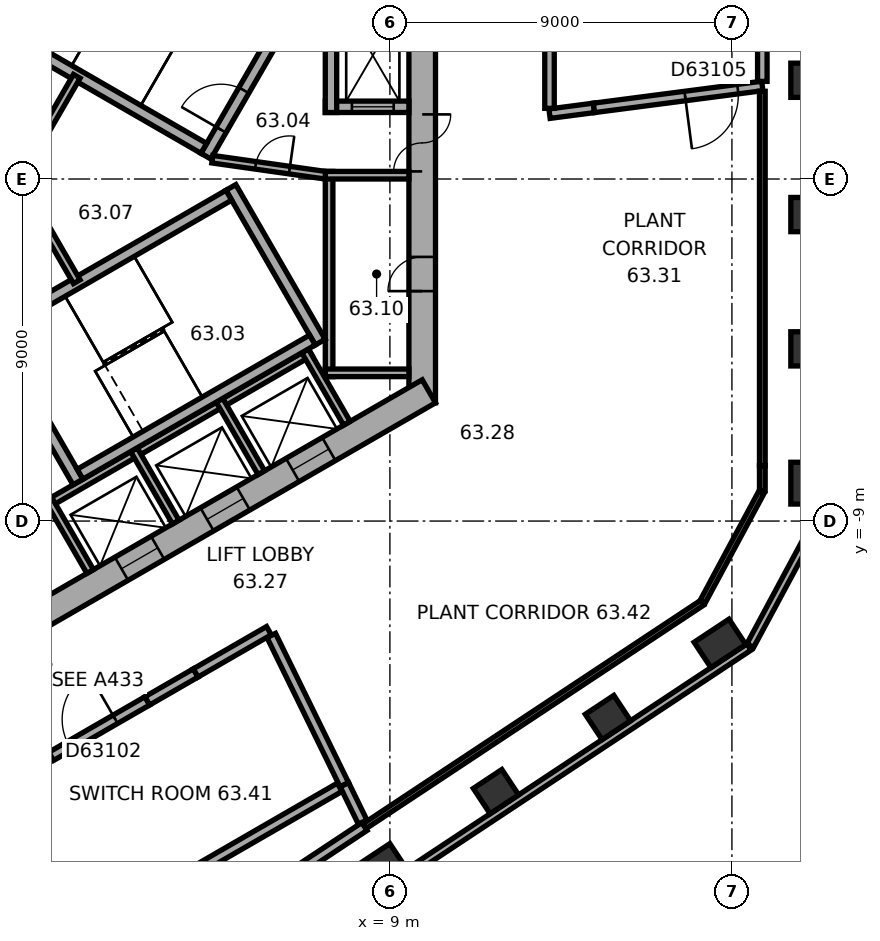
"""IFC4 building model, lengths in metres.
Left out: names, types, materials, properties, quantities, classifications, styles, units other than length and angle.
Written with IfcOpenShell. Run it as: python <this file> out.ifc"""

import sys

from ifc_helpers import new_model, si_unit, direction, frame, frame_2d, origin, origin_2d, place, context, subcontext, project, spatial, rectangle, extrude, element, fill, save


model = new_model("IFC4")
c1 = context("Model", 3, precision=1e-05, world=origin(), true_north=direction((0.0, 1.0)))
c2 = subcontext(c1, "Body", "Model", "MODEL_VIEW")
j1 = project(units=[si_unit("LENGTHUNIT", "METRE"), si_unit("PLANEANGLEUNIT", "RADIAN")], contexts=[c1])
p1 = place(None, origin())
s1 = spatial("IfcSite", under=j1, at=p1, CompositionType="ELEMENT")
p2 = place(p1, origin())
s2 = spatial("IfcBuilding", under=s1, at=p2, CompositionType="ELEMENT")
p3 = place(p2, frame((0.0, 0.0, 255.0)))
s3 = spatial("IfcBuildingStorey", under=s2, at=p3, CompositionType="ELEMENT", Elevation=255.0)
p4 = place(p3, frame((19.95, -8.003, 0.0), z_axis=(0.0, 0.0, 1.0), x_axis=(0.0, 1.0, 0.0)))
e1 = element("IfcColumn", 1, at=p4, inside=s3, PredefinedType="COLUMN", context=c2, shape_type="SweptSolid", body=[
    extrude(rectangle(XDim=1.1, YDim=0.8, at=origin_2d()), origin(), (0.0, 0.0, 1.0), 4.8),
])
for number, where, z_axis, x_axis in (
    (2, (19.95, -4.469, 0.0), (0.0, 0.0, 1.0), (0.0, 1.0, 0.0)),
    (3, (19.95, -0.936, 0.0), (0.0, 0.0, 1.0), (0.0, 1.0, 0.0)),
    (4, (19.95, 2.598, 0.0), (0.0, 0.0, 1.0), (0.0, 1.0, 0.0)),
    (5, (8.844, -18.07, 0.0), (0.0, 0.0, 1.0), (0.834, 0.552, 0.0)),
    (6, (11.791, -16.12, 0.0), (0.0, 0.0, 1.0), (0.834, 0.552, 0.0)),
    (7, (14.738, -14.169, 0.0), (0.0, 0.0, 1.0), (0.834, 0.552, 0.0)),
):
    element("IfcColumn", number, at=place(p3, frame(where, z_axis=z_axis, x_axis=x_axis)), inside=s3, PredefinedType="COLUMN", context=c2, shape_type="SweptSolid", body=[
        extrude(rectangle(XDim=0.9, YDim=0.8, at=origin_2d()), origin(), (0.0, 0.0, 1.0), 4.8),
    ])
p5 = place(p3, frame((17.685, -12.219, 0.0), z_axis=(0.0, 0.0, 1.0), x_axis=(0.833885822067, 0.551936985312, 0.0)))
e8 = element("IfcColumn", 8, at=p5, inside=s3, PredefinedType="COLUMN", context=c2, shape_type="SweptSolid", body=[
    extrude(rectangle(XDim=1.1, YDim=0.8, at=origin_2d()), origin(), (0.0, 0.0, 1.0), 4.8),
])
p6 = place(p3, frame((9.85, -5.889, 0.0), z_axis=(0.0, 0.0, 1.0), x_axis=(0.0, 1.0, 0.0)))
e9 = element("IfcWall", 9, at=p6, inside=s3, PredefinedType="SHEAR", context=c2, shape_type="SweptSolid", body=[
    extrude(rectangle(XDim=11.778, YDim=0.7, at=frame_2d((5.889, 0.0))), origin(), (0.0, 0.0, 1.0), 4.8),
])
p7 = place(p6, frame((6.089, 0.0, 0.0)))
e10 = element("IfcOpeningElement", 10, at=p7, cuts=e9, PredefinedType="OPENING", context=c2, shape_type="SweptSolid", body=[
    extrude(rectangle(XDim=1.5, YDim=2.1, at=frame_2d((0.75, 1.05))), frame((0.0, 0.36, 0.0), z_axis=(0.0, -1.0, 0.0), x_axis=(1.0, 0.0, 0.0)), (0.0, 0.0, 1.0), 0.72),
])
p8 = place(p6, frame((2.939, 0.0, 0.0)))
e11 = element("IfcOpeningElement", 11, at=p8, cuts=e9, PredefinedType="OPENING", context=c2, shape_type="SweptSolid", body=[
    extrude(rectangle(XDim=0.9, YDim=2.1, at=frame_2d((0.45, 1.05))), frame((0.0, 0.36, 0.0), z_axis=(0.0, -1.0, 0.0), x_axis=(1.0, 0.0, 0.0)), (0.0, 0.0, 1.0), 0.72),
])
p9 = place(p3, frame((-10.025, -5.586, 0.0), z_axis=(0.0, 0.0, 1.0), x_axis=(0.866026453023, -0.499998182661, 0.0)))
e12 = element("IfcWall", 12, at=p9, inside=s3, PredefinedType="SHEAR", context=c2, shape_type="SweptSolid", body=[
    extrude(rectangle(XDim=11.778, YDim=0.7, at=frame_2d((5.889, 0.0))), origin(), (0.0, 0.0, 1.0), 4.8),
])
p10 = place(p9, frame((6.089, 0.0, 0.0)))
e13 = element("IfcOpeningElement", 13, at=p10, cuts=e12, PredefinedType="OPENING", context=c2, shape_type="SweptSolid", body=[
    extrude(rectangle(XDim=1.5, YDim=2.1, at=frame_2d((0.75, 1.05))), frame((0.0, 0.36, 0.0), z_axis=(0.0, -1.0, 0.0), x_axis=(1.0, 0.0, 0.0)), (0.0, 0.0, 1.0), 0.72),
])
p11 = place(p9, frame((1.539, 0.0, 0.0)))
e14 = element("IfcOpeningElement", 14, at=p11, cuts=e12, PredefinedType="OPENING", context=c2, shape_type="SweptSolid", body=[
    extrude(rectangle(XDim=1.1, YDim=2.1, at=frame_2d((0.55, 1.05))), frame((0.0, 0.36, 0.0), z_axis=(0.0, -1.0, 0.0), x_axis=(1.0, 0.0, 0.0)), (0.0, 0.0, 1.0), 0.72),
])
p12 = place(p9, frame((4.139, 0.0, 0.0)))
e15 = element("IfcOpeningElement", 15, at=p12, cuts=e12, PredefinedType="OPENING", context=c2, shape_type="SweptSolid", body=[
    extrude(rectangle(XDim=1.1, YDim=2.1, at=frame_2d((0.55, 1.05))), frame((0.0, 0.36, 0.0), z_axis=(0.0, -1.0, 0.0), x_axis=(1.0, 0.0, 0.0)), (0.0, 0.0, 1.0), 0.72),
])
p13 = place(p3, frame((-0.175, -11.475, 0.0), z_axis=(0.0, 0.0, 1.0), x_axis=(0.866026453023, 0.499998182661, 0.0)))
e16 = element("IfcWall", 16, at=p13, inside=s3, PredefinedType="SHEAR", context=c2, shape_type="SweptSolid", body=[
    extrude(rectangle(XDim=11.778, YDim=0.7, at=frame_2d((5.889, 0.0))), origin(), (0.0, 0.0, 1.0), 4.8),
])
p14 = place(p13, frame((2.439, 0.0, 0.0)))
e17 = element("IfcOpeningElement", 17, at=p14, cuts=e16, PredefinedType="OPENING", context=c2, shape_type="SweptSolid", body=[
    extrude(rectangle(XDim=1.1, YDim=2.1, at=frame_2d((0.55, 1.05))), frame((0.0, 0.36, 0.0), z_axis=(0.0, -1.0, 0.0), x_axis=(1.0, 0.0, 0.0)), (0.0, 0.0, 1.0), 0.72),
])
p15 = place(p13, frame((5.039, 0.0, 0.0)))
e18 = element("IfcOpeningElement", 18, at=p15, cuts=e16, PredefinedType="OPENING", context=c2, shape_type="SweptSolid", body=[
    extrude(rectangle(XDim=1.1, YDim=2.1, at=frame_2d((0.55, 1.05))), frame((0.0, 0.36, 0.0), z_axis=(0.0, -1.0, 0.0), x_axis=(1.0, 0.0, 0.0)), (0.0, 0.0, 1.0), 0.72),
])
p16 = place(p13, frame((7.639, 0.0, 0.0)))
e19 = element("IfcOpeningElement", 19, at=p16, cuts=e16, PredefinedType="OPENING", context=c2, shape_type="SweptSolid", body=[
    extrude(rectangle(XDim=1.1, YDim=2.1, at=frame_2d((0.55, 1.05))), frame((0.0, 0.36, 0.0), z_axis=(0.0, -1.0, 0.0), x_axis=(1.0, 0.0, 0.0)), (0.0, 0.0, 1.0), 0.72),
])
p17 = place(p3, frame((2.739, -22.711, 0.0), z_axis=(0.0, 0.0, 1.0), x_axis=(0.833885723098, 0.551937134838, 0.0)))
e20 = element("IfcWall", 20, at=p17, inside=s3, PredefinedType="STANDARD", context=c2, shape_type="SweptSolid", body=[
    extrude(rectangle(XDim=18.841, YDim=0.2, at=frame_2d((9.421, 0.0))), origin(), (0.0, 0.0, 1.0), 4.8),
])
p18 = place(p3, frame((18.483, -12.276, 0.0), z_axis=(0.0, 0.0, 1.0), x_axis=(0.473267675015, 0.880918672629, 0.0)))
e21 = element("IfcWall", 21, at=p18, inside=s3, PredefinedType="STANDARD", context=c2, shape_type="SweptSolid", body=[
    extrude(rectangle(XDim=4.13, YDim=0.2, at=frame_2d((2.065, 0.0))), origin(), (0.0, 0.0, 1.0), 4.8),
])
p19 = place(p3, frame((7.4, -5.2, 0.0), z_axis=(0.0, 0.0, 1.0), x_axis=(0.0, 1.0, 0.0)))
e22 = element("IfcWall", 22, at=p19, inside=s3, PredefinedType="PARTITIONING", context=c2, shape_type="SweptSolid", body=[
    extrude(rectangle(XDim=5.4, YDim=0.2, at=frame_2d((2.7, 0.0))), origin(), (0.0, 0.0, 1.0), 4.52),
])
for number, where, z_axis, x_axis in (
    (23, (7.3, -5.1, 0.0), (0.0, 0.0, 1.0), (1.0, 0.0, 0.0)),
    (24, (7.3, 0.1, 0.0), (0.0, 0.0, 1.0), (1.0, 0.0, 0.0)),
):
    element("IfcWall", number, at=place(p3, frame(where, z_axis=z_axis, x_axis=x_axis)), inside=s3, PredefinedType="PARTITIONING", context=c2, shape_type="SweptSolid", body=[
        extrude(rectangle(XDim=2.2, YDim=0.2, at=frame_2d((1.1, 0.0))), origin(), (0.0, 0.0, 1.0), 4.52),
    ])
p20 = place(p3, frame((-0.024, -8.559, 0.0), z_axis=(0.0, 0.0, 1.0), x_axis=(0.866026010844, 0.49999894854, 0.0)))
e25 = element("IfcWall", 25, at=p20, inside=s3, PredefinedType="PARTITIONING", context=c2, shape_type="SweptSolid", body=[
    extrude(rectangle(XDim=8.0, YDim=0.2, at=frame_2d((4.0, 0.0))), origin(), (0.0, 0.0, 1.0), 4.52),
])
for number, where, z_axis, x_axis in (
    (26, (0.013, -8.422, 0.0), (0.0, 0.0, 1.0), (0.5, -0.866, 0.0)),
    (27, (2.264, -7.122, 0.0), (0.0, 0.0, 1.0), (0.5, -0.866, 0.0)),
    (28, (4.516, -5.822, 0.0), (0.0, 0.0, 1.0), (0.5, -0.866, 0.0)),
    (29, (6.768, -4.522, 0.0), (0.0, 0.0, 1.0), (0.5, -0.866, 0.0)),
):
    element("IfcWall", number, at=place(p3, frame(where, z_axis=z_axis, x_axis=x_axis)), inside=s3, PredefinedType="PARTITIONING", context=c2, shape_type="SweptSolid", body=[
        extrude(rectangle(XDim=2.2, YDim=0.2, at=frame_2d((1.1, 0.0))), origin(), (0.0, 0.0, 1.0), 4.52),
    ])
p21 = place(p3, frame((4.158, 0.602, 0.0), z_axis=(0.0, 0.0, 1.0), x_axis=(0.499977259774, 0.866038532462, 0.0)))
e30 = element("IfcWall", 30, at=p21, inside=s3, PredefinedType="SHEAR", context=c2, shape_type="SweptSolid", body=[
    extrude(rectangle(XDim=4.7, YDim=0.3, at=frame_2d((2.35, 0.0))), origin(), (0.0, 0.0, 1.0), 4.52),
])
p22 = place(p21, frame((0.8, 0.0, 0.0)))
e31 = element("IfcOpeningElement", 31, at=p22, cuts=e30, PredefinedType="OPENING", context=c2, shape_type="SweptSolid", body=[
    extrude(rectangle(XDim=1.2, YDim=2.1, at=frame_2d((0.6, 1.05))), frame((0.0, 0.16, 0.0), z_axis=(0.0, -1.0, 0.0), x_axis=(1.0, 0.0, 0.0)), (0.0, 0.0, 1.0), 0.32),
])
p23 = place(p3, frame((4.103, 0.807, 0.0), z_axis=(0.0, 0.0, 1.0), x_axis=(-0.866027801685, 0.499995846692, 0.0)))
e32 = element("IfcWall", 32, at=p23, inside=s3, PredefinedType="SHEAR", context=c2, shape_type="SweptSolid", body=[
    extrude(rectangle(XDim=7.06, YDim=0.3, at=frame_2d((3.53, 0.0))), origin(), (0.0, 0.0, 1.0), 4.52),
])
p24 = place(p3, frame((-1.558, -3.902, 0.0), z_axis=(0.0, 0.0, 1.0), x_axis=(0.499977259774, -0.866038532462, 0.0)))
e33 = element("IfcWall", 33, at=p24, inside=s3, PredefinedType="SHEAR", context=c2, shape_type="SweptSolid", body=[
    extrude(rectangle(XDim=4.7, YDim=0.3, at=frame_2d((2.35, 0.0))), origin(), (0.0, 0.0, 1.0), 4.52),
])
p25 = place(p24, frame((0.8, 0.0, 0.0)))
e34 = element("IfcOpeningElement", 34, at=p25, cuts=e33, PredefinedType="OPENING", context=c2, shape_type="SweptSolid", body=[
    extrude(rectangle(XDim=1.2, YDim=2.1, at=frame_2d((0.6, 1.05))), frame((0.0, 0.16, 0.0), z_axis=(0.0, -1.0, 0.0), x_axis=(1.0, 0.0, 0.0)), (0.0, 0.0, 1.0), 0.32),
])
p26 = place(p3, frame((4.816, -0.222, 0.0), z_axis=(0.0, 0.0, 1.0), x_axis=(0.499977259774, -0.866038532462, 0.0)))
e35 = element("IfcWall", 35, at=p26, inside=s3, PredefinedType="SHEAR", context=c2, shape_type="SweptSolid", body=[
    extrude(rectangle(XDim=4.7, YDim=0.3, at=frame_2d((2.35, 0.0))), origin(), (0.0, 0.0, 1.0), 4.52),
])
for number, where, z_axis, x_axis in (
    (36, (-1.353, -3.957, 0.0), (0.0, 0.0, 1.0), (0.866, 0.5, 0.0)),
    (37, (0.847, -7.767, 0.0), (0.0, 0.0, 1.0), (0.866, 0.5, 0.0)),
):
    element("IfcWall", number, at=place(p3, frame(where, z_axis=z_axis, x_axis=x_axis)), inside=s3, PredefinedType="SHEAR", context=c2, shape_type="SweptSolid", body=[
        extrude(rectangle(XDim=7.06, YDim=0.3, at=frame_2d((3.53, 0.0))), origin(), (0.0, 0.0, 1.0), 4.52),
    ])
p27 = place(p3, frame((7.3, 1.9, 0.0), z_axis=(0.0, 0.0, 1.0), x_axis=(1.0, 0.0, 0.0)))
e38 = element("IfcWall", 38, at=p27, inside=s3, PredefinedType="SHEAR", context=c2, shape_type="SweptSolid", body=[
    extrude(rectangle(XDim=2.2, YDim=0.3, at=frame_2d((1.1, 0.0))), origin(), (0.0, 0.0, 1.0), 4.52),
])
p28 = place(p27, frame((0.7, 0.0, 0.0)))
e39 = element("IfcOpeningElement", 39, at=p28, cuts=e38, PredefinedType="OPENING", context=c2, shape_type="SweptSolid", body=[
    extrude(rectangle(XDim=1.1, YDim=2.1, at=frame_2d((0.55, 1.05))), frame((0.0, 0.16, 0.0), z_axis=(0.0, -1.0, 0.0), x_axis=(1.0, 0.0, 0.0)), (0.0, 0.0, 1.0), 0.32),
])
p29 = place(p3, frame((7.45, 1.75, 0.0), z_axis=(0.0, 0.0, 1.0), x_axis=(0.0, 1.0, 0.0)))
e40 = element("IfcWall", 40, at=p29, inside=s3, PredefinedType="SHEAR", context=c2, shape_type="SweptSolid", body=[
    extrude(rectangle(XDim=3.35, YDim=0.3, at=frame_2d((1.675, 0.0))), origin(), (0.0, 0.0, 1.0), 4.52),
])
p30 = place(p3, frame((4.327, 0.521, 0.0), z_axis=(0.0, 0.0, 1.0), x_axis=(0.990124376366, -0.14019172346, 0.0)))
e41 = element("IfcWall", 41, at=p30, inside=s3, PredefinedType="PARTITIONING", context=c2, shape_type="SweptSolid", body=[
    extrude(rectangle(XDim=3.002, YDim=0.2, at=frame_2d((1.501, 0.0))), origin(), (0.0, 0.0, 1.0), 4.52),
])
p31 = place(p30, frame((1.15, 0.0, 0.0)))
e42 = element("IfcOpeningElement", 42, at=p31, cuts=e41, PredefinedType="OPENING", context=c2, shape_type="SweptSolid", body=[
    extrude(rectangle(XDim=0.9, YDim=2.1, at=frame_2d((0.45, 1.05))), frame((0.0, 0.11, 0.0), z_axis=(0.0, -1.0, 0.0), x_axis=(1.0, 0.0, 0.0)), (0.0, 0.0, 1.0), 0.22),
])
for number, where, z_axis, x_axis in (
    (43, (-0.86, -0.104, 0.0), (0.0, 0.0, 1.0), (0.5, 0.866, 0.0)),
    (44, (-0.86, 0.104, 0.0), (0.0, 0.0, 1.0), (0.5, -0.866, 0.0)),
):
    element("IfcWall", number, at=place(p3, frame(where, z_axis=z_axis, x_axis=x_axis)), inside=s3, PredefinedType="PARTITIONING", context=c2, shape_type="SweptSolid", body=[
        extrude(rectangle(XDim=3.24, YDim=0.2, at=frame_2d((1.62, 0.0))), origin(), (0.0, 0.0, 1.0), 4.52),
    ])
p32 = place(p3, frame((8.33, -17.038, 0.0), z_axis=(0.0, 0.0, 1.0), x_axis=(-0.833910848154, -0.551899173156, 0.0)))
e45 = element("IfcWall", 45, at=p32, inside=s3, PredefinedType="SOLIDWALL", context=c2, shape_type="SweptSolid", body=[
    extrude(rectangle(XDim=7.35, YDim=0.25, at=frame_2d((3.675, 0.0))), origin(), (0.0, 0.0, 1.0), 4.02),
])
p33 = place(p3, frame((8.282, -16.921, 0.0), z_axis=(0.0, 0.0, 1.0), x_axis=(-0.438730750158, 0.898618566949, 0.0)))
e46 = element("IfcWall", 46, at=p33, inside=s3, PredefinedType="SOLIDWALL", context=c2, shape_type="SweptSolid", body=[
    extrude(rectangle(XDim=1.096, YDim=0.25, at=frame_2d((0.548, 0.0))), origin(), (0.0, 0.0, 1.0), 3.6),
])
p34 = place(p3, frame((7.678, -16.005, 0.0), z_axis=(0.0, 0.0, 1.0), x_axis=(-0.866021420858, -0.500006898567, 0.0)))
e47 = element("IfcWall", 47, at=p34, inside=s3, PredefinedType="SOLIDWALL", context=c2, shape_type="SweptSolid", body=[
    extrude(rectangle(XDim=8.866, YDim=0.25, at=frame_2d((4.433, 0.0))), origin(), (0.0, 0.0, 1.0), 4.52),
])
p35 = place(p3, frame((7.799, -15.934, 0.0), z_axis=(0.0, 0.0, 1.0), x_axis=(-0.439688100098, 0.898150530052, 0.0)))
e48 = element("IfcWall", 48, at=p35, inside=s3, PredefinedType="SOLIDWALL", context=c2, shape_type="SweptSolid", body=[
    extrude(rectangle(XDim=4.369, YDim=0.25, at=frame_2d((2.185, 0.0))), origin(), (0.0, 0.0, 1.0), 3.6),
])
p36 = place(p3, frame((2.616, -13.731, 0.0), z_axis=(0.0, 0.0, 1.0), x_axis=(-0.866043624834, -0.499968438888, 0.0)))
e49 = element("IfcWall", 49, at=p36, inside=s3, PredefinedType="SOLIDWALL", context=c2, shape_type="SweptSolid", body=[
    extrude(rectangle(XDim=2.921, YDim=0.25, at=frame_2d((1.46, 0.0))), origin(), (0.0, 0.0, 1.0), 4.52),
])
p37 = place(p36, frame((0.971, 0.0, 0.0)))
e50 = element("IfcOpeningElement", 50, at=p37, cuts=e49, PredefinedType="OPENING", context=c2, shape_type="SweptSolid", body=[
    extrude(rectangle(XDim=1.4, YDim=2.1, at=frame_2d((0.7, 1.05))), frame((0.0, 0.135, 0.0), z_axis=(0.0, -1.0, 0.0), x_axis=(1.0, 0.0, 0.0)), (0.0, 0.0, 1.0), 0.27),
])
p38 = place(p3, frame((2.616, -13.731, 0.0), z_axis=(0.0, 0.0, 1.0), x_axis=(0.866047289552, 0.499962090823, 0.0)))
e51 = element("IfcWall", 51, at=p38, inside=s3, PredefinedType="SOLIDWALL", context=c2, shape_type="SweptSolid", body=[
    extrude(rectangle(XDim=1.47, YDim=0.25, at=frame_2d((0.735, 0.0))), origin(), (0.0, 0.0, 1.0), 4.52),
])
p39 = place(p3, frame((3.889, -12.997, 0.0), z_axis=(0.0, 0.0, 1.0), x_axis=(0.866026623601, 0.49999788721, 0.0)))
e52 = element("IfcWall", 52, at=p39, inside=s3, PredefinedType="SOLIDWALL", context=c2, shape_type="SweptSolid", body=[
    extrude(rectangle(XDim=2.225, YDim=0.25, at=frame_2d((1.113, 0.0))), origin(), (0.0, 0.0, 1.0), 4.52),
])
p40 = place(p3, frame((17.215, -11.151, 0.0), z_axis=(0.0, 0.0, 1.0), x_axis=(-0.833876794276, -0.551950624575, 0.0)))
e53 = element("IfcWall", 53, at=p40, inside=s3, PredefinedType="PARTITIONING", context=c2, shape_type="SweptSolid", body=[
    extrude(rectangle(XDim=10.646, YDim=0.15, at=frame_2d((5.323, 0.0))), origin(), (0.0, 0.0, 1.0), 4.02),
])
p41 = place(p3, frame((18.781, -8.235, 0.0), z_axis=(0.0, 0.0, 1.0), x_axis=(-0.47330262929, -0.880899892784, 0.0)))
e54 = element("IfcWall", 54, at=p41, inside=s3, PredefinedType="PARTITIONING", context=c2, shape_type="SweptSolid", body=[
    extrude(rectangle(XDim=3.27, YDim=0.15, at=frame_2d((1.635, 0.0))), origin(), (0.0, 0.0, 1.0), 4.52),
])
p42 = place(p3, frame((18.8, -7.542, 0.0), z_axis=(0.0, 0.0, 1.0), x_axis=(0.0, -1.0, 0.0)))
e55 = element("IfcWall", 55, at=p42, inside=s3, PredefinedType="PARTITIONING", context=c2, shape_type="SweptSolid", body=[
    extrude(rectangle(XDim=0.658, YDim=0.15, at=frame_2d((0.329, 0.0))), origin(), (0.0, 0.0, 1.0), 4.52),
])
p43 = place(p3, frame((14.369, 1.872, 0.0), z_axis=(0.0, 0.0, 1.0), x_axis=(-0.991594638447, -0.129383434035, 0.0)))
e56 = element("IfcWall", 56, at=p43, inside=s3, PredefinedType="SOLIDWALL", context=c2, shape_type="SweptSolid", body=[
    extrude(rectangle(XDim=1.179, YDim=0.25, at=frame_2d((0.59, 0.0))), origin(), (0.0, 0.0, 1.0), 3.6),
])
p44 = place(p3, frame((14.369, 1.872, 0.0), z_axis=(0.0, 0.0, 1.0), x_axis=(0.991629331996, 0.129117264244, 0.0)))
e57 = element("IfcWall", 57, at=p44, inside=s3, PredefinedType="SOLIDWALL", context=c2, shape_type="SweptSolid", body=[
    extrude(rectangle(XDim=4.468, YDim=0.25, at=frame_2d((2.234, 0.0))), origin(), (0.0, 0.0, 1.0), 3.6),
])
p45 = place(p44, frame((2.418, 0.0, 0.0)))
e58 = element("IfcOpeningElement", 58, at=p45, cuts=e57, PredefinedType="OPENING", context=c2, shape_type="SweptSolid", body=[
    extrude(rectangle(XDim=1.4, YDim=2.1, at=frame_2d((0.7, 1.05))), frame((0.0, 0.135, 0.0), z_axis=(0.0, -1.0, 0.0), x_axis=(1.0, 0.0, 0.0)), (0.0, 0.0, 1.0), 0.27),
])
p46 = place(p3, frame((18.8, 2.309, 0.0), z_axis=(0.0, 0.0, 1.0), x_axis=(0.0, -1.0, 0.0)))
e59 = element("IfcWall", 59, at=p46, inside=s3, PredefinedType="PARTITIONING", context=c2, shape_type="SweptSolid", body=[
    extrude(rectangle(XDim=9.85, YDim=0.15, at=frame_2d((4.925, 0.0))), origin(), (0.0, 0.0, 1.0), 4.02),
])
p47 = place(p3, frame((13.2, 7.521, 0.0), z_axis=(0.0, 0.0, 1.0), x_axis=(0.0, -1.0, 0.0)))
e60 = element("IfcWall", 60, at=p47, inside=s3, PredefinedType="SOLIDWALL", context=c2, shape_type="SweptSolid", body=[
    extrude(rectangle(XDim=5.662, YDim=0.25, at=frame_2d((2.831, 0.0))), origin(), (0.0, 0.0, 1.0), 4.52),
])
p48 = place(p3, frame((18.8, 9.811, 0.0), z_axis=(0.0, 0.0, 1.0), x_axis=(0.0, -1.0, 0.0)))
e61 = element("IfcWall", 61, at=p48, inside=s3, PredefinedType="SOLIDWALL", context=c2, shape_type="SweptSolid", body=[
    extrude(rectangle(XDim=7.242, YDim=0.25, at=frame_2d((3.621, 0.0))), origin(), (0.0, 0.0, 1.0), 4.02),
])
p49 = place(p7, origin())
e62 = element("IfcDoor", 62, at=p49, inside=s3, OperationType="DOUBLE_DOOR_SINGLE_SWING", PredefinedType="DOOR", context=c2, shape_type="SweptSolid", body=[
    extrude(rectangle(XDim=1.5, YDim=2.1, at=frame_2d((0.75, 1.05))), frame((0.0, 0.025, 0.0), z_axis=(0.0, -1.0, 0.0), x_axis=(1.0, 0.0, 0.0)), (0.0, 0.0, 1.0), 0.05),
])
fill(e10, e62)
p50 = place(p22, origin())
e63 = element("IfcDoor", 63, at=p50, inside=s3, OperationType="SINGLE_SWING_RIGHT", PredefinedType="DOOR", context=c2, shape_type="SweptSolid", body=[
    extrude(rectangle(XDim=1.2, YDim=2.1, at=frame_2d((0.6, 1.05))), frame((0.0, 0.025, 0.0), z_axis=(0.0, -1.0, 0.0), x_axis=(1.0, 0.0, 0.0)), (0.0, 0.0, 1.0), 0.05),
])
fill(e31, e63)
p51 = place(p31, origin())
e64 = element("IfcDoor", 64, at=p51, inside=s3, OperationType="SINGLE_SWING_LEFT", PredefinedType="DOOR", context=c2, shape_type="SweptSolid", body=[
    extrude(rectangle(XDim=0.9, YDim=2.1, at=frame_2d((0.45, 1.05))), frame((0.0, 0.025, 0.0), z_axis=(0.0, -1.0, 0.0), x_axis=(1.0, 0.0, 0.0)), (0.0, 0.0, 1.0), 0.05),
])
fill(e42, e64)
p52 = place(p8, origin())
e65 = element("IfcDoor", 65, at=p52, inside=s3, OperationType="SINGLE_SWING_LEFT", PredefinedType="DOOR", context=c2, shape_type="SweptSolid", body=[
    extrude(rectangle(XDim=0.9, YDim=2.1, at=frame_2d((0.45, 1.05))), frame((0.0, 0.025, 0.0), z_axis=(0.0, -1.0, 0.0), x_axis=(1.0, 0.0, 0.0)), (0.0, 0.0, 1.0), 0.05),
])
fill(e11, e65)
p53 = place(p28, origin())
e66 = element("IfcDoor", 66, at=p53, inside=s3, OperationType="DOUBLE_DOOR_SLIDING", PredefinedType="DOOR", context=c2, shape_type="SweptSolid", body=[
    extrude(rectangle(XDim=1.1, YDim=2.1, at=frame_2d((0.55, 1.05))), frame((0.0, 0.025, 0.0), z_axis=(0.0, -1.0, 0.0), x_axis=(1.0, 0.0, 0.0)), (0.0, 0.0, 1.0), 0.05),
])
fill(e39, e66)
p54 = place(p14, origin())
e67 = element("IfcDoor", 67, at=p54, inside=s3, OperationType="DOUBLE_DOOR_SLIDING", PredefinedType="DOOR", context=c2, shape_type="SweptSolid", body=[
    extrude(rectangle(XDim=1.1, YDim=2.1, at=frame_2d((0.55, 1.05))), frame((0.0, 0.025, 0.0), z_axis=(0.0, -1.0, 0.0), x_axis=(1.0, 0.0, 0.0)), (0.0, 0.0, 1.0), 0.05),
])
fill(e17, e67)
p55 = place(p15, origin())
e68 = element("IfcDoor", 68, at=p55, inside=s3, OperationType="DOUBLE_DOOR_SLIDING", PredefinedType="DOOR", context=c2, shape_type="SweptSolid", body=[
    extrude(rectangle(XDim=1.1, YDim=2.1, at=frame_2d((0.55, 1.05))), frame((0.0, 0.025, 0.0), z_axis=(0.0, -1.0, 0.0), x_axis=(1.0, 0.0, 0.0)), (0.0, 0.0, 1.0), 0.05),
])
fill(e18, e68)
p56 = place(p16, origin())
e69 = element("IfcDoor", 69, at=p56, inside=s3, OperationType="DOUBLE_DOOR_SLIDING", PredefinedType="DOOR", context=c2, shape_type="SweptSolid", body=[
    extrude(rectangle(XDim=1.1, YDim=2.1, at=frame_2d((0.55, 1.05))), frame((0.0, 0.025, 0.0), z_axis=(0.0, -1.0, 0.0), x_axis=(1.0, 0.0, 0.0)), (0.0, 0.0, 1.0), 0.05),
])
fill(e19, e69)
p57 = place(p37, origin())
e70 = element("IfcDoor", 70, at=p57, inside=s3, OperationType="SINGLE_SWING_LEFT", PredefinedType="DOOR", context=c2, shape_type="SweptSolid", body=[
    extrude(rectangle(XDim=1.4, YDim=2.1, at=frame_2d((0.7, 1.05))), frame((0.0, 0.025, 0.0), z_axis=(0.0, -1.0, 0.0), x_axis=(1.0, 0.0, 0.0)), (0.0, 0.0, 1.0), 0.05),
])
fill(e50, e70)
p58 = place(p45, origin())
e71 = element("IfcDoor", 71, at=p58, inside=s3, OperationType="SINGLE_SWING_LEFT", PredefinedType="DOOR", context=c2, shape_type="SweptSolid", body=[
    extrude(rectangle(XDim=1.4, YDim=2.1, at=frame_2d((0.7, 1.05))), frame((0.0, 0.025, 0.0), z_axis=(0.0, -1.0, 0.0), x_axis=(1.0, 0.0, 0.0)), (0.0, 0.0, 1.0), 0.05),
])
fill(e58, e71)
save(model, sys.argv[1])
